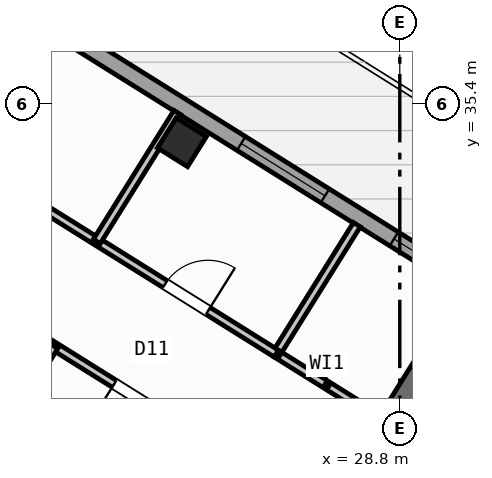
"""IFC4 building model, lengths in metres.
Left out: names, types, materials, properties, quantities, classifications, styles, units other than length and angle.
Written with IfcOpenShell. Run it as: python <this file> out.ifc"""

import sys

from ifc_helpers import new_model, si_unit, direction, frame, frame_2d, origin, origin_2d, place, context, subcontext, project, spatial, rectangle, hollow_rectangle, extrude, source, transform, mapped, element, fill, save


model = new_model("IFC4")
c1 = context("Model", 3, precision=1e-05, world=origin(), true_north=direction((0.0, 1.0)))
c2 = subcontext(c1, "Body", "Model", "MODEL_VIEW")
j1 = project(units=[si_unit("LENGTHUNIT", "METRE"), si_unit("PLANEANGLEUNIT", "RADIAN")], contexts=[c1])
p1 = place(None, origin())
s1 = spatial("IfcSite", under=j1, at=p1, CompositionType="ELEMENT")
p2 = place(p1, origin())
s2 = spatial("IfcBuilding", under=s1, at=p2, CompositionType="ELEMENT")
p3 = place(p2, frame((0.0, 0.0, 262.8)))
s3 = spatial("IfcBuildingStorey", under=s2, at=p3, CompositionType="ELEMENT", Elevation=262.8)
p4 = place(p3, frame((29.544, 30.636, 0.0), z_axis=(0.0, 0.0, 1.0), x_axis=(-0.529902075036, -0.848058836916, 0.0)))
e1 = element("IfcWall", 1, at=p4, inside=s3, PredefinedType="SHEAR", context=c2, shape_type="SweptSolid", body=[
    extrude(rectangle(XDim=3.625, YDim=0.45, at=frame_2d((1.812, 0.0))), origin(), (0.0, 0.0, 1.0), 3.35),
])
m1 = source(origin(), c2, "Body", "SweptSolid", [
    extrude(hollow_rectangle(XDim=0.7, YDim=0.7, WallThickness=0.028, at=origin_2d()), origin(), (0.0, 0.0, 1.0), 3.6),
])
p5 = place(p3, frame((24.5, 34.643, 0.0), z_axis=(0.0, 0.0, 1.0), x_axis=(-0.848048096156, 0.529919264233, 0.0)))
e2 = element("IfcColumn", 2, at=p5, inside=s3, PredefinedType="COLUMN", context=c2, shape_type="MappedRepresentation", body=[
    mapped(m1, transform((0.0, 0.0, 0.0), scale=1.0)),
])
p6 = place(p3, frame((14.138, 41.825, 0.0), z_axis=(0.0, 0.0, 1.0), x_axis=(0.848046498049, -0.529921821731, 0.0)))
e3 = element("IfcWall", 3, at=p6, inside=s3, PredefinedType="STANDARD", context=c2, shape_type="SweptSolid", body=[
    extrude(rectangle(XDim=31.588, YDim=0.32, at=frame_2d((15.794, 0.0))), origin(), (0.0, 0.0, 1.0), 3.35),
])
p7 = place(p6, frame((3.568, 0.0, 0.0)))
e4 = element("IfcOpeningElement", 4, at=p7, cuts=e3, PredefinedType="OPENING", context=c2, shape_type="SweptSolid", body=[
    extrude(rectangle(XDim=1.05, YDim=2.15, at=frame_2d((0.525, 1.075))), frame((0.0, 0.17, 0.0), z_axis=(0.0, -1.0, 0.0), x_axis=(1.0, 0.0, 0.0)), (0.0, 0.0, 1.0), 0.34),
])
p8 = place(p6, frame((1.046, 0.0, 0.9)))
e5 = element("IfcOpeningElement", 5, at=p8, cuts=e3, PredefinedType="OPENING", context=c2, shape_type="SweptSolid", body=[
    extrude(rectangle(XDim=1.65, YDim=1.45, at=frame_2d((0.825, 0.725))), frame((0.0, 0.17, 0.0), z_axis=(0.0, -1.0, 0.0), x_axis=(1.0, 0.0, 0.0)), (0.0, 0.0, 1.0), 0.34),
])
p9 = place(p6, frame((8.61, 0.0, 0.9)))
e6 = element("IfcOpeningElement", 6, at=p9, cuts=e3, PredefinedType="OPENING", context=c2, shape_type="SweptSolid", body=[
    extrude(rectangle(XDim=1.35, YDim=1.45, at=frame_2d((0.675, 0.725))), frame((0.0, 0.17, 0.0), z_axis=(0.0, -1.0, 0.0), x_axis=(1.0, 0.0, 0.0)), (0.0, 0.0, 1.0), 0.34),
])
p10 = place(p6, frame((13.599, 0.0, 0.95)))
e7 = element("IfcOpeningElement", 7, at=p10, cuts=e3, PredefinedType="OPENING", context=c2, shape_type="SweptSolid", body=[
    extrude(rectangle(XDim=1.95, YDim=1.35, at=frame_2d((0.975, 0.675))), frame((0.0, 0.17, 0.0), z_axis=(0.0, -1.0, 0.0), x_axis=(1.0, 0.0, 0.0)), (0.0, 0.0, 1.0), 0.34),
])
p11 = place(p6, frame((17.154, 0.0, 1.0)))
e8 = element("IfcOpeningElement", 8, at=p11, cuts=e3, PredefinedType="OPENING", context=c2, shape_type="SweptSolid", body=[
    extrude(rectangle(XDim=0.9, YDim=1.25, at=frame_2d((0.45, 0.625))), frame((0.0, 0.17, 0.0), z_axis=(0.0, -1.0, 0.0), x_axis=(1.0, 0.0, 0.0)), (0.0, 0.0, 1.0), 0.34),
])
p12 = place(p6, frame((21.719, 0.0, 0.9)))
e9 = element("IfcOpeningElement", 9, at=p12, cuts=e3, PredefinedType="OPENING", context=c2, shape_type="SweptSolid", body=[
    extrude(rectangle(XDim=1.65, YDim=1.45, at=frame_2d((0.825, 0.725))), frame((0.0, 0.17, 0.0), z_axis=(0.0, -1.0, 0.0), x_axis=(1.0, 0.0, 0.0)), (0.0, 0.0, 1.0), 0.34),
])
p13 = place(p6, frame((27.419, 0.0, 0.9)))
e10 = element("IfcOpeningElement", 10, at=p13, cuts=e3, PredefinedType="OPENING", context=c2, shape_type="SweptSolid", body=[
    extrude(rectangle(XDim=1.65, YDim=1.45, at=frame_2d((0.825, 0.725))), frame((0.0, 0.17, 0.0), z_axis=(0.0, -1.0, 0.0), x_axis=(1.0, 0.0, 0.0)), (0.0, 0.0, 1.0), 0.34),
])
p14 = place(p3, frame((28.363, 29.222, 0.0), z_axis=(0.0, 0.0, 1.0), x_axis=(-0.848062280664, 0.529896563599, 0.0)))
e11 = element("IfcWall", 11, at=p14, inside=s3, PredefinedType="PARTITIONING", context=c2, shape_type="SweptSolid", body=[
    extrude(rectangle(XDim=2.358, YDim=0.16, at=frame_2d((1.179, 0.0))), origin(), (0.0, 0.0, 1.0), 3.34),
])
p15 = place(p3, frame((27.953, 33.016, 0.0), z_axis=(0.0, 0.0, 1.0), x_axis=(-0.529874576144, -0.848076018737, 0.0)))
e12 = element("IfcWall", 12, at=p15, inside=s3, PredefinedType="PARTITIONING", context=c2, shape_type="SweptSolid", body=[
    extrude(rectangle(XDim=3.0, YDim=0.16, at=frame_2d((1.5, 0.0))), origin(), (0.0, 0.0, 1.0), 3.34),
])
p16 = place(p3, frame((26.363, 30.472, 0.0), z_axis=(0.0, 0.0, 1.0), x_axis=(-0.848052408131, 0.529912363569, 0.0)))
e13 = element("IfcWall", 13, at=p16, inside=s3, PredefinedType="PARTITIONING", context=c2, shape_type="SweptSolid", body=[
    extrude(rectangle(XDim=16.73, YDim=0.16, at=frame_2d((8.365, 0.0))), origin(), (0.0, 0.0, 1.0), 3.34),
])
p17 = place(p16, frame((1.588, 0.0, 0.0)))
e14 = element("IfcOpeningElement", 14, at=p17, cuts=e13, PredefinedType="OPENING", context=c2, shape_type="SweptSolid", body=[
    extrude(rectangle(XDim=1.0, YDim=2.1, at=frame_2d((0.5, 1.05))), frame((0.0, 0.09, 0.0), z_axis=(0.0, -1.0, 0.0), x_axis=(1.0, 0.0, 0.0)), (0.0, 0.0, 1.0), 0.18),
])
p18 = place(p16, frame((6.685, 0.0, 0.0)))
e15 = element("IfcOpeningElement", 15, at=p18, cuts=e13, PredefinedType="OPENING", context=c2, shape_type="SweptSolid", body=[
    extrude(rectangle(XDim=1.0, YDim=2.1, at=frame_2d((0.5, 1.05))), frame((0.0, 0.09, 0.0), z_axis=(0.0, -1.0, 0.0), x_axis=(1.0, 0.0, 0.0)), (0.0, 0.0, 1.0), 0.18),
])
p19 = place(p16, frame((12.951, 0.0, 0.0)))
e16 = element("IfcOpeningElement", 16, at=p19, cuts=e13, PredefinedType="OPENING", context=c2, shape_type="SweptSolid", body=[
    extrude(rectangle(XDim=1.0, YDim=2.1, at=frame_2d((0.5, 1.05))), frame((0.0, 0.09, 0.0), z_axis=(0.0, -1.0, 0.0), x_axis=(1.0, 0.0, 0.0)), (0.0, 0.0, 1.0), 0.18),
])
p20 = place(p3, frame((25.198, 28.606, 0.0), z_axis=(0.0, 0.0, 1.0), x_axis=(-0.848052408131, 0.529912363569, 0.0)))
e17 = element("IfcWall", 17, at=p20, inside=s3, PredefinedType="PARTITIONING", context=c2, shape_type="SweptSolid", body=[
    extrude(rectangle(XDim=16.73, YDim=0.16, at=frame_2d((8.365, 0.0))), origin(), (0.0, 0.0, 1.0), 3.34),
])
p21 = place(p20, frame((1.395, 0.0, 0.0)))
e18 = element("IfcOpeningElement", 18, at=p21, cuts=e17, PredefinedType="OPENING", context=c2, shape_type="SweptSolid", body=[
    extrude(rectangle(XDim=1.0, YDim=2.1, at=frame_2d((0.5, 1.05))), frame((0.0, 0.09, 0.0), z_axis=(0.0, -1.0, 0.0), x_axis=(1.0, 0.0, 0.0)), (0.0, 0.0, 1.0), 0.18),
])
p22 = place(p20, frame((7.82, 0.0, 0.0)))
e19 = element("IfcOpeningElement", 19, at=p22, cuts=e17, PredefinedType="OPENING", context=c2, shape_type="SweptSolid", body=[
    extrude(rectangle(XDim=1.0, YDim=2.1, at=frame_2d((0.5, 1.05))), frame((0.0, 0.09, 0.0), z_axis=(0.0, -1.0, 0.0), x_axis=(1.0, 0.0, 0.0)), (0.0, 0.0, 1.0), 0.18),
])
p23 = place(p20, frame((14.76, 0.0, 0.0)))
e20 = element("IfcOpeningElement", 20, at=p23, cuts=e17, PredefinedType="OPENING", context=c2, shape_type="SweptSolid", body=[
    extrude(rectangle(XDim=1.0, YDim=2.1, at=frame_2d((0.5, 1.05))), frame((0.0, 0.09, 0.0), z_axis=(0.0, -1.0, 0.0), x_axis=(1.0, 0.0, 0.0)), (0.0, 0.0, 1.0), 0.18),
])
p24 = place(p3, frame((21.983, 30.615, 0.0), z_axis=(0.0, 0.0, 1.0), x_axis=(-0.5299186965, -0.848048450915, 0.0)))
e21 = element("IfcWall", 21, at=p24, inside=s3, PredefinedType="PARTITIONING", context=c2, shape_type="SweptSolid", body=[
    extrude(rectangle(XDim=2.188, YDim=0.16, at=frame_2d((1.094, 0.0))), origin(), (0.0, 0.0, 1.0), 2.875),
])
p25 = place(p3, frame((24.411, 35.229, 0.0), z_axis=(0.0, 0.0, 1.0), x_axis=(-0.529874576144, -0.848076018737, 0.0)))
e22 = element("IfcWall", 22, at=p25, inside=s3, PredefinedType="PARTITIONING", context=c2, shape_type="SweptSolid", body=[
    extrude(rectangle(XDim=3.0, YDim=0.16, at=frame_2d((1.5, 0.0))), origin(), (0.0, 0.0, 1.0), 3.34),
])
m2 = source(origin(), c2, "Body", "SweptSolid", [
    extrude(rectangle(XDim=1.95, YDim=1.35, at=frame_2d((0.975, 0.675))), frame((0.0, 0.03, 0.0), z_axis=(0.0, -1.0, 0.0), x_axis=(1.0, 0.0, 0.0)), (0.0, 0.0, 1.0), 0.06),
])
p26 = place(p10, origin())
e23 = element("IfcWindow", 23, at=p26, inside=s3, PartitioningType="SINGLE_PANEL", PredefinedType="WINDOW", context=c2, shape_type="MappedRepresentation", body=[
    mapped(m2, transform((0.0, 0.0, 0.0), scale=1.0)),
])
fill(e7, e23)
m3 = source(origin(), c2, "Body", "SweptSolid", [
    extrude(rectangle(XDim=0.9, YDim=1.25, at=frame_2d((0.45, 0.625))), frame((0.0, 0.03, 0.0), z_axis=(0.0, -1.0, 0.0), x_axis=(1.0, 0.0, 0.0)), (0.0, 0.0, 1.0), 0.06),
])
p27 = place(p11, origin())
e24 = element("IfcWindow", 24, at=p27, inside=s3, PartitioningType="SINGLE_PANEL", PredefinedType="WINDOW", context=c2, shape_type="MappedRepresentation", body=[
    mapped(m3, transform((0.0, 0.0, 0.0), scale=1.0)),
])
fill(e8, e24)
m4 = source(origin(), c2, "Body", "SweptSolid", [
    extrude(rectangle(XDim=1.0, YDim=2.1, at=frame_2d((0.5, 1.05))), frame((0.0, 0.025, 0.0), z_axis=(0.0, -1.0, 0.0), x_axis=(1.0, 0.0, 0.0)), (0.0, 0.0, 1.0), 0.05),
])
p28 = place(p21, origin())
e25 = element("IfcDoor", 25, at=p28, inside=s3, OperationType="SINGLE_SWING_RIGHT", PredefinedType="DOOR", context=c2, shape_type="MappedRepresentation", body=[
    mapped(m4, transform((0.0, 0.0, 0.0), scale=1.0)),
])
fill(e18, e25)
p29 = place(p17, frame((1.0, 0.0, 0.0), z_axis=(0.0, 0.0, 1.0), x_axis=(-1.0, 0.0, 0.0)))
e26 = element("IfcDoor", 26, at=p29, inside=s3, OperationType="SINGLE_SWING_RIGHT", PredefinedType="DOOR", context=c2, shape_type="MappedRepresentation", body=[
    mapped(m4, transform((0.0, 0.0, 0.0), scale=1.0)),
])
fill(e14, e26)
save(model, sys.argv[1])
